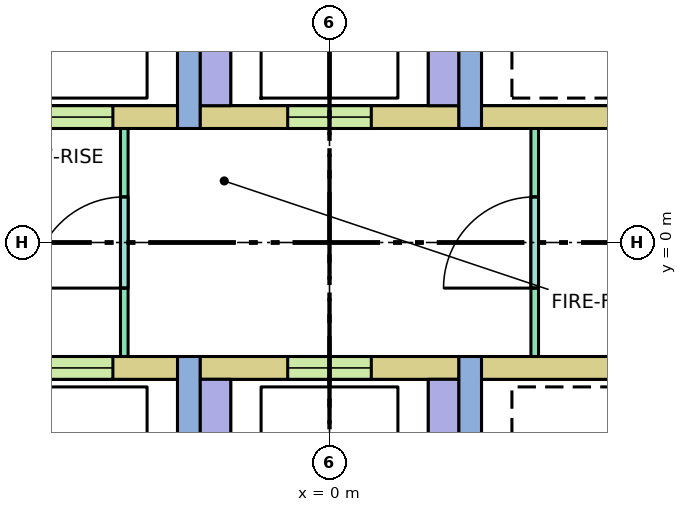
"""IFC4 building model, lengths in metres.
Left out: names, types, materials, properties, quantities, classifications, styles, units other than length and angle.
Written with IfcOpenShell. Run it as: python <this file> out.ifc"""

import sys

from ifc_helpers import new_model, si_unit, direction, frame, frame_2d, origin, place, context, subcontext, project, spatial, rectangle, extrude, element, fill, save


model = new_model("IFC4")
c1 = context("Model", 3, precision=1e-05, world=origin(), true_north=direction((0.0, 1.0)))
c2 = subcontext(c1, "Body", "Model", "MODEL_VIEW")
j1 = project(units=[si_unit("LENGTHUNIT", "METRE"), si_unit("PLANEANGLEUNIT", "RADIAN")], contexts=[c1])
p1 = place(None, origin())
s1 = spatial("IfcSite", under=j1, at=p1, CompositionType="ELEMENT")
p2 = place(p1, origin())
s2 = spatial("IfcBuilding", under=s1, at=p2, CompositionType="ELEMENT")
p3 = place(p2, frame((0.0, 0.0, 27.0)))
s3 = spatial("IfcBuildingStorey", under=s2, at=p3, CompositionType="ELEMENT", Elevation=27.0)
p4 = place(p3, frame((-10.1, 1.65, 0.0), z_axis=(0.0, 0.0, 1.0), x_axis=(1.0, 0.0, 0.0)))
e1 = element("IfcWall", 1, at=p4, inside=s3, PredefinedType="SOLIDWALL", context=c2, shape_type="SweptSolid", body=[
    extrude(rectangle(XDim=8.1, YDim=0.3, at=frame_2d((4.05, 0.0))), origin(), (0.0, 0.0, 1.0), 3.72),
])
p5 = place(p4, frame((0.7, 0.0, 0.0)))
e2 = element("IfcOpeningElement", 2, at=p5, cuts=e1, PredefinedType="OPENING", context=c2, shape_type="SweptSolid", body=[
    extrude(rectangle(XDim=1.1, YDim=2.1, at=frame_2d((0.55, 1.05))), frame((0.0, 0.16, 0.0), z_axis=(0.0, -1.0, 0.0), x_axis=(1.0, 0.0, 0.0)), (0.0, 0.0, 1.0), 0.32),
])
p6 = place(p4, frame((3.5, 0.0, 0.0)))
e3 = element("IfcOpeningElement", 3, at=p6, cuts=e1, PredefinedType="OPENING", context=c2, shape_type="SweptSolid", body=[
    extrude(rectangle(XDim=1.1, YDim=2.1, at=frame_2d((0.55, 1.05))), frame((0.0, 0.16, 0.0), z_axis=(0.0, -1.0, 0.0), x_axis=(1.0, 0.0, 0.0)), (0.0, 0.0, 1.0), 0.32),
])
p7 = place(p4, frame((6.15, 0.0, 0.0)))
e4 = element("IfcOpeningElement", 4, at=p7, cuts=e1, PredefinedType="OPENING", context=c2, shape_type="SweptSolid", body=[
    extrude(rectangle(XDim=1.1, YDim=2.1, at=frame_2d((0.55, 1.05))), frame((0.0, 0.16, 0.0), z_axis=(0.0, -1.0, 0.0), x_axis=(1.0, 0.0, 0.0)), (0.0, 0.0, 1.0), 0.32),
])
p8 = place(p3, frame((-10.1, -1.65, 0.0), z_axis=(0.0, 0.0, 1.0), x_axis=(1.0, 0.0, 0.0)))
e5 = element("IfcWall", 5, at=p8, inside=s3, PredefinedType="SOLIDWALL", context=c2, shape_type="SweptSolid", body=[
    extrude(rectangle(XDim=8.1, YDim=0.3, at=frame_2d((4.05, 0.0))), origin(), (0.0, 0.0, 1.0), 3.72),
])
p9 = place(p8, frame((0.7, 0.0, 0.0)))
e6 = element("IfcOpeningElement", 6, at=p9, cuts=e5, PredefinedType="OPENING", context=c2, shape_type="SweptSolid", body=[
    extrude(rectangle(XDim=1.1, YDim=2.1, at=frame_2d((0.55, 1.05))), frame((0.0, 0.16, 0.0), z_axis=(0.0, -1.0, 0.0), x_axis=(1.0, 0.0, 0.0)), (0.0, 0.0, 1.0), 0.32),
])
p10 = place(p8, frame((3.5, 0.0, 0.0)))
e7 = element("IfcOpeningElement", 7, at=p10, cuts=e5, PredefinedType="OPENING", context=c2, shape_type="SweptSolid", body=[
    extrude(rectangle(XDim=1.1, YDim=2.1, at=frame_2d((0.55, 1.05))), frame((0.0, 0.16, 0.0), z_axis=(0.0, -1.0, 0.0), x_axis=(1.0, 0.0, 0.0)), (0.0, 0.0, 1.0), 0.32),
])
p11 = place(p8, frame((6.15, 0.0, 0.0)))
e8 = element("IfcOpeningElement", 8, at=p11, cuts=e5, PredefinedType="OPENING", context=c2, shape_type="SweptSolid", body=[
    extrude(rectangle(XDim=1.1, YDim=2.1, at=frame_2d((0.55, 1.05))), frame((0.0, 0.16, 0.0), z_axis=(0.0, -1.0, 0.0), x_axis=(1.0, 0.0, 0.0)), (0.0, 0.0, 1.0), 0.32),
])
for number, where, z_axis, x_axis in (
    (9, (2.0, 1.65, 0.0), (0.0, 0.0, 1.0), (1.0, 0.0, 0.0)),
    (10, (2.0, -1.65, 0.0), (0.0, 0.0, 1.0), (1.0, 0.0, 0.0)),
):
    element("IfcWall", number, at=place(p3, frame(where, z_axis=z_axis, x_axis=x_axis)), inside=s3, PredefinedType="SOLIDWALL", context=c2, shape_type="SweptSolid", body=[
        extrude(rectangle(XDim=8.1, YDim=0.3, at=frame_2d((4.05, 0.0))), origin(), (0.0, 0.0, 1.0), 3.72),
    ])
for number, where, z_axis, x_axis in (
    (11, (-1.85, 1.5, 0.0), (0.0, 0.0, 1.0), (0.0, 1.0, 0.0)),
    (12, (-1.85, -8.1, 0.0), (0.0, 0.0, 1.0), (0.0, 1.0, 0.0)),
    (13, (1.85, 1.5, 0.0), (0.0, 0.0, 1.0), (0.0, 1.0, 0.0)),
    (14, (1.85, -8.1, 0.0), (0.0, 0.0, 1.0), (0.0, 1.0, 0.0)),
):
    element("IfcWall", number, at=place(p3, frame(where, z_axis=z_axis, x_axis=x_axis)), inside=s3, PredefinedType="SHEAR", context=c2, shape_type="SweptSolid", body=[
        extrude(rectangle(XDim=6.6, YDim=0.3, at=frame_2d((3.3, 0.0))), origin(), (0.0, 0.0, 1.0), 3.72),
    ])
p12 = place(p3, frame((-1.7, 1.65, 0.0), z_axis=(0.0, 0.0, 1.0), x_axis=(1.0, 0.0, 0.0)))
e15 = element("IfcWall", 15, at=p12, inside=s3, PredefinedType="SOLIDWALL", context=c2, shape_type="SweptSolid", body=[
    extrude(rectangle(XDim=3.4, YDim=0.3, at=frame_2d((1.7, 0.0))), origin(), (0.0, 0.0, 1.0), 3.72),
])
p13 = place(p12, frame((1.15, 0.0, 0.0)))
e16 = element("IfcOpeningElement", 16, at=p13, cuts=e15, PredefinedType="OPENING", context=c2, shape_type="SweptSolid", body=[
    extrude(rectangle(XDim=1.1, YDim=2.1, at=frame_2d((0.55, 1.05))), frame((0.0, 0.16, 0.0), z_axis=(0.0, -1.0, 0.0), x_axis=(1.0, 0.0, 0.0)), (0.0, 0.0, 1.0), 0.32),
])
p14 = place(p3, frame((-1.7, -1.65, 0.0), z_axis=(0.0, 0.0, 1.0), x_axis=(1.0, 0.0, 0.0)))
e17 = element("IfcWall", 17, at=p14, inside=s3, PredefinedType="SOLIDWALL", context=c2, shape_type="SweptSolid", body=[
    extrude(rectangle(XDim=3.4, YDim=0.3, at=frame_2d((1.7, 0.0))), origin(), (0.0, 0.0, 1.0), 3.72),
])
p15 = place(p14, frame((1.15, 0.0, 0.0)))
e18 = element("IfcOpeningElement", 18, at=p15, cuts=e17, PredefinedType="OPENING", context=c2, shape_type="SweptSolid", body=[
    extrude(rectangle(XDim=1.1, YDim=2.1, at=frame_2d((0.55, 1.05))), frame((0.0, 0.16, 0.0), z_axis=(0.0, -1.0, 0.0), x_axis=(1.0, 0.0, 0.0)), (0.0, 0.0, 1.0), 0.32),
])
for number, where, z_axis, x_axis in (
    (19, (-1.5, 1.8, 0.0), (0.0, 0.0, 1.0), (0.0, 1.0, 0.0)),
    (20, (-1.5, -4.8, 0.0), (0.0, 0.0, 1.0), (0.0, 1.0, 0.0)),
    (21, (1.5, 1.8, 0.0), (0.0, 0.0, 1.0), (0.0, 1.0, 0.0)),
    (22, (1.5, -4.8, 0.0), (0.0, 0.0, 1.0), (0.0, 1.0, 0.0)),
):
    element("IfcWall", number, at=place(p3, frame(where, z_axis=z_axis, x_axis=x_axis)), inside=s3, PredefinedType="SOLIDWALL", context=c2, shape_type="SweptSolid", body=[
        extrude(rectangle(XDim=3.0, YDim=0.4, at=frame_2d((1.5, 0.0))), origin(), (0.0, 0.0, 1.0), 3.72),
    ])
p16 = place(p3, frame((-2.7, -1.5, 0.0), z_axis=(0.0, 0.0, 1.0), x_axis=(0.0, 1.0, 0.0)))
e23 = element("IfcWall", 23, at=p16, inside=s3, PredefinedType="PARTITIONING", context=c2, shape_type="SweptSolid", body=[
    extrude(rectangle(XDim=3.0, YDim=0.1, at=frame_2d((1.5, 0.0))), origin(), (0.0, 0.0, 1.0), 3.72),
])
p17 = place(p16, frame((0.9, 0.0, 0.0)))
e24 = element("IfcOpeningElement", 24, at=p17, cuts=e23, PredefinedType="OPENING", context=c2, shape_type="SweptSolid", body=[
    extrude(rectangle(XDim=1.2, YDim=2.1, at=frame_2d((0.6, 1.05))), frame((0.0, 0.06, 0.0), z_axis=(0.0, -1.0, 0.0), x_axis=(1.0, 0.0, 0.0)), (0.0, 0.0, 1.0), 0.12),
])
p18 = place(p3, frame((2.7, -1.5, 0.0), z_axis=(0.0, 0.0, 1.0), x_axis=(0.0, 1.0, 0.0)))
e25 = element("IfcWall", 25, at=p18, inside=s3, PredefinedType="PARTITIONING", context=c2, shape_type="SweptSolid", body=[
    extrude(rectangle(XDim=3.0, YDim=0.1, at=frame_2d((1.5, 0.0))), origin(), (0.0, 0.0, 1.0), 3.72),
])
p19 = place(p18, frame((0.9, 0.0, 0.0)))
e26 = element("IfcOpeningElement", 26, at=p19, cuts=e25, PredefinedType="OPENING", context=c2, shape_type="SweptSolid", body=[
    extrude(rectangle(XDim=1.2, YDim=2.1, at=frame_2d((0.6, 1.05))), frame((0.0, 0.06, 0.0), z_axis=(0.0, -1.0, 0.0), x_axis=(1.0, 0.0, 0.0)), (0.0, 0.0, 1.0), 0.12),
])
p20 = place(p7, origin())
e27 = element("IfcDoor", 27, at=p20, inside=s3, OperationType="DOUBLE_DOOR_SLIDING", PredefinedType="DOOR", context=c2, shape_type="SweptSolid", body=[
    extrude(rectangle(XDim=1.1, YDim=2.1, at=frame_2d((0.55, 1.05))), frame((0.0, 0.025, 0.0), z_axis=(0.0, -1.0, 0.0), x_axis=(1.0, 0.0, 0.0)), (0.0, 0.0, 1.0), 0.05),
])
fill(e4, e27)
p21 = place(p11, origin())
e28 = element("IfcDoor", 28, at=p21, inside=s3, OperationType="DOUBLE_DOOR_SLIDING", PredefinedType="DOOR", context=c2, shape_type="SweptSolid", body=[
    extrude(rectangle(XDim=1.1, YDim=2.1, at=frame_2d((0.55, 1.05))), frame((0.0, 0.025, 0.0), z_axis=(0.0, -1.0, 0.0), x_axis=(1.0, 0.0, 0.0)), (0.0, 0.0, 1.0), 0.05),
])
fill(e8, e28)
p22 = place(p13, origin())
e29 = element("IfcDoor", 29, at=p22, inside=s3, OperationType="DOUBLE_DOOR_SLIDING", PredefinedType="DOOR", context=c2, shape_type="SweptSolid", body=[
    extrude(rectangle(XDim=1.1, YDim=2.1, at=frame_2d((0.55, 1.05))), frame((0.0, 0.025, 0.0), z_axis=(0.0, -1.0, 0.0), x_axis=(1.0, 0.0, 0.0)), (0.0, 0.0, 1.0), 0.05),
])
fill(e16, e29)
p23 = place(p15, origin())
e30 = element("IfcDoor", 30, at=p23, inside=s3, OperationType="DOUBLE_DOOR_SLIDING", PredefinedType="DOOR", context=c2, shape_type="SweptSolid", body=[
    extrude(rectangle(XDim=1.1, YDim=2.1, at=frame_2d((0.55, 1.05))), frame((0.0, 0.025, 0.0), z_axis=(0.0, -1.0, 0.0), x_axis=(1.0, 0.0, 0.0)), (0.0, 0.0, 1.0), 0.05),
])
fill(e18, e30)
p24 = place(p17, origin())
e31 = element("IfcDoor", 31, at=p24, inside=s3, OperationType="SINGLE_SWING_LEFT", PredefinedType="DOOR", context=c2, shape_type="SweptSolid", body=[
    extrude(rectangle(XDim=1.2, YDim=2.1, at=frame_2d((0.6, 1.05))), frame((0.0, 0.025, 0.0), z_axis=(0.0, -1.0, 0.0), x_axis=(1.0, 0.0, 0.0)), (0.0, 0.0, 1.0), 0.05),
])
fill(e24, e31)
p25 = place(p19, origin())
e32 = element("IfcDoor", 32, at=p25, inside=s3, OperationType="SINGLE_SWING_LEFT", PredefinedType="DOOR", context=c2, shape_type="SweptSolid", body=[
    extrude(rectangle(XDim=1.2, YDim=2.1, at=frame_2d((0.6, 1.05))), frame((0.0, 0.025, 0.0), z_axis=(0.0, -1.0, 0.0), x_axis=(1.0, 0.0, 0.0)), (0.0, 0.0, 1.0), 0.05),
])
fill(e26, e32)
save(model, sys.argv[1])
